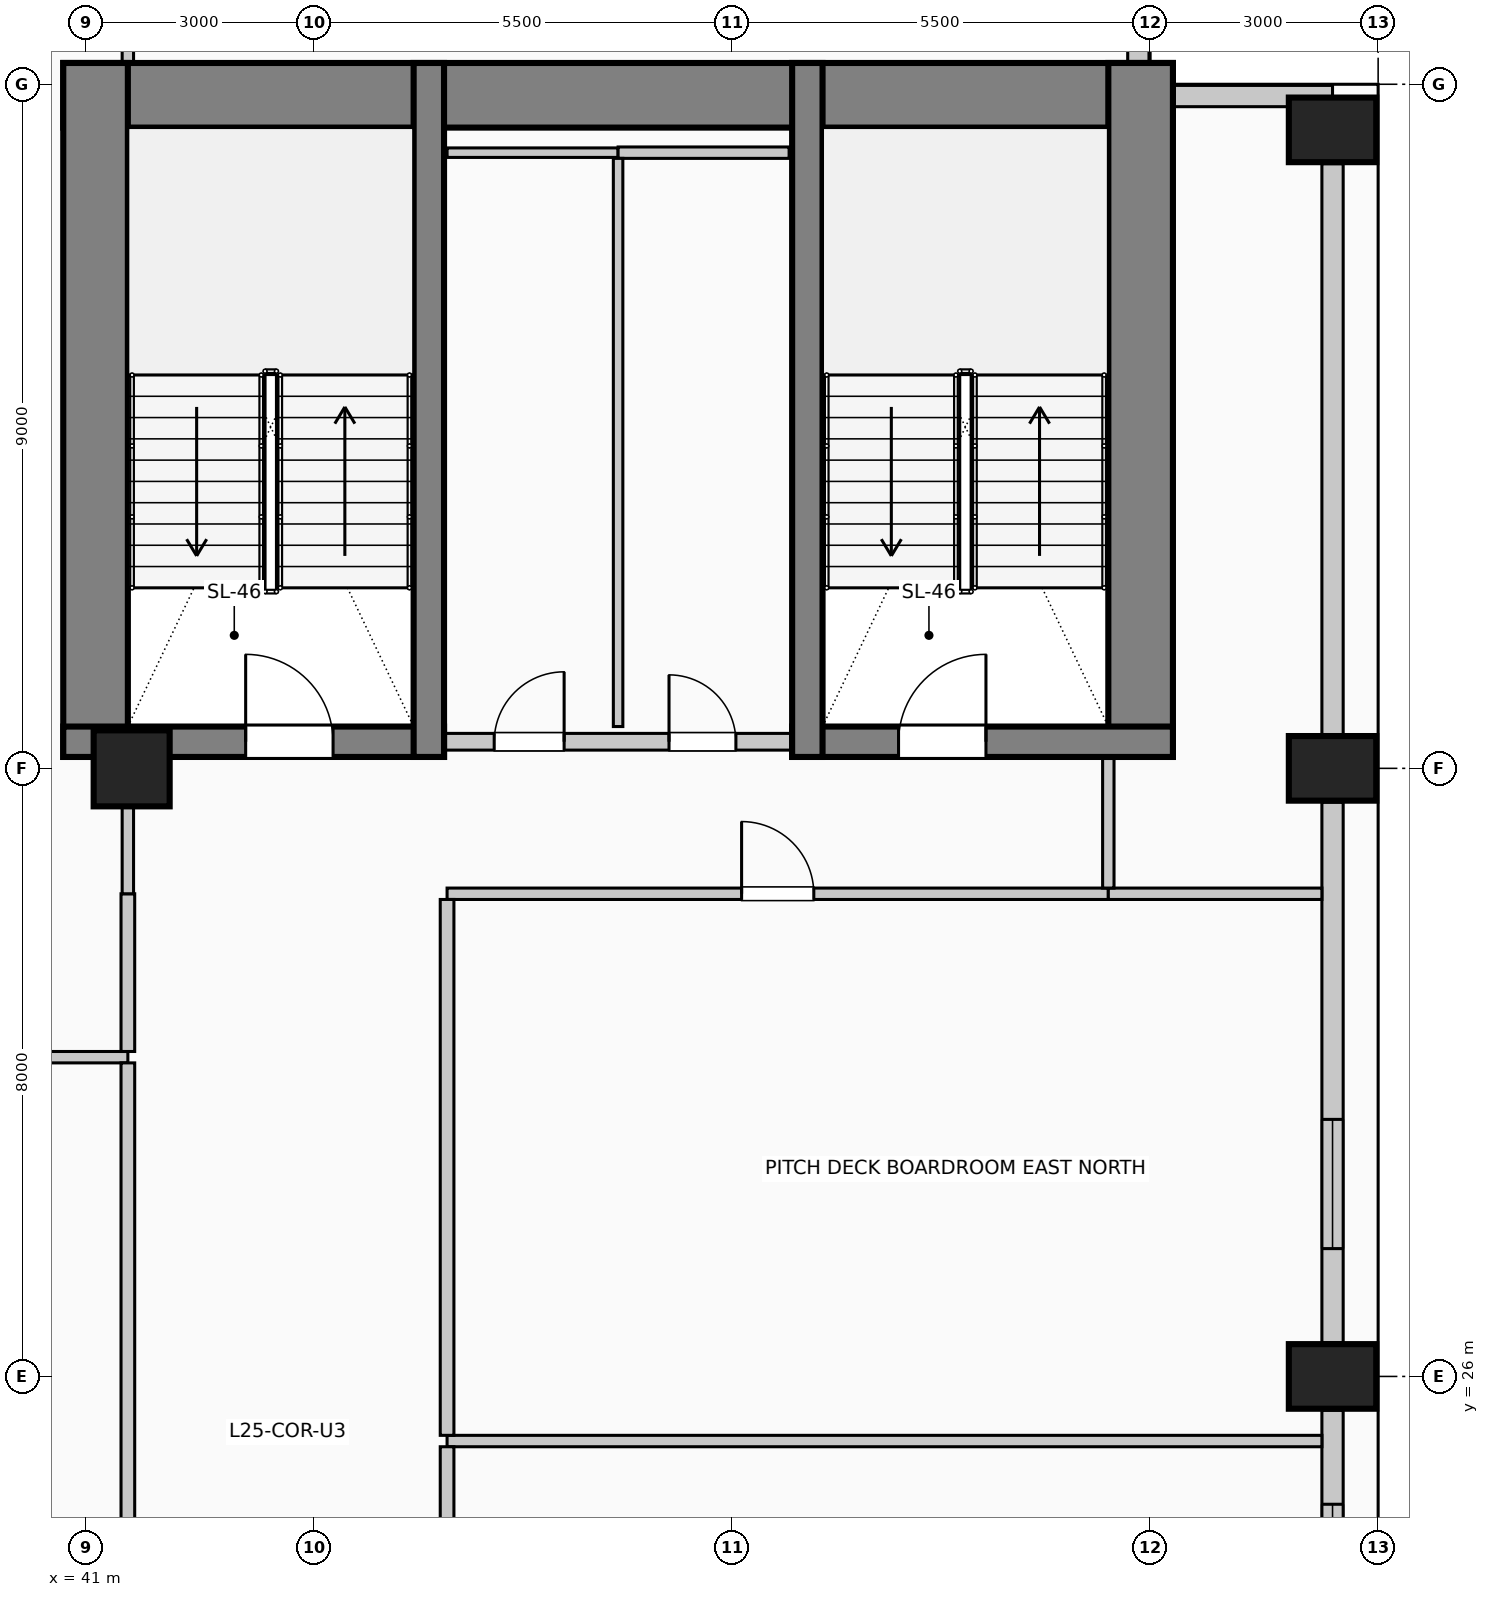
"""IFC4 building model, lengths in metres.
Left out: names, types, materials, properties, quantities, classifications, styles, units other than length and angle.
Written with IfcOpenShell. Run it as: python <this file> out.ifc"""

import sys

from ifc_helpers import new_model, si_unit, direction, frame, frame_2d, origin, origin_2d, place, context, subcontext, project, spatial, rectangle, circle, extrude, element, fill, save


model = new_model("IFC4")
c1 = context("Model", 3, precision=1e-05, world=origin(), true_north=direction((0.0, 1.0)))
c2 = subcontext(c1, "Body", "Model", "MODEL_VIEW")
j1 = project(units=[si_unit("LENGTHUNIT", "METRE"), si_unit("PLANEANGLEUNIT", "RADIAN")], contexts=[c1])
p1 = place(None, origin())
s1 = spatial("IfcSite", under=j1, at=p1, CompositionType="ELEMENT")
p2 = place(p1, origin())
s2 = spatial("IfcBuilding", under=s1, at=p2, CompositionType="ELEMENT")
p3 = place(p2, frame((0.0, 0.0, 104.6)))
s3 = spatial("IfcBuildingStorey", under=s2, at=p3, CompositionType="ELEMENT", Elevation=104.6)
p4 = place(p3, frame((40.7, 42.855, 0.0), z_axis=(0.0, 0.0, 1.0), x_axis=(1.0, 0.0, 0.0)))
e1 = element("IfcWall", 1, at=p4, inside=s3, PredefinedType="SHEAR", context=c2, shape_type="SweptSolid", body=[
    extrude(rectangle(XDim=14.6, YDim=0.85, at=frame_2d((7.3, 0.0))), origin(), (0.0, 0.0, 1.0), 4.0),
])
for number, where, z_axis, x_axis in (
    (2, (41.125, 34.15, 0.0), (0.0, 0.0, 1.0), (0.0, 1.0, 0.0)),
    (3, (54.875, 34.15, 0.0), (0.0, 0.0, 1.0), (0.0, 1.0, 0.0)),
):
    element("IfcWall", number, at=place(p3, frame(where, z_axis=z_axis, x_axis=x_axis)), inside=s3, PredefinedType="SHEAR", context=c2, shape_type="SweptSolid", body=[
        extrude(rectangle(XDim=9.13, YDim=0.85, at=frame_2d((4.565, 0.0))), origin(), (0.0, 0.0, 1.0), 4.0),
    ])
p5 = place(p3, frame((40.7, 34.35, 0.0), z_axis=(0.0, 0.0, 1.0), x_axis=(1.0, 0.0, 0.0)))
e4 = element("IfcWall", 4, at=p5, inside=s3, PredefinedType="SHEAR", context=c2, shape_type="SweptSolid", body=[
    extrude(rectangle(XDim=5.01, YDim=0.4, at=frame_2d((2.505, 0.0))), origin(), (0.0, 0.0, 1.0), 4.0),
])
p6 = place(p5, frame((2.4, 0.0, 0.0)))
e5 = element("IfcOpeningElement", 5, at=p6, cuts=e4, PredefinedType="OPENING", context=c2, shape_type="SweptSolid", body=[
    extrude(rectangle(XDim=1.15, YDim=2.2, at=frame_2d((0.575, 1.1))), frame((0.0, 0.21, 0.0), z_axis=(0.0, -1.0, 0.0), x_axis=(1.0, 0.0, 0.0)), (0.0, 0.0, 1.0), 0.42),
])
p7 = place(p3, frame((45.51, 34.15, 0.0), z_axis=(0.0, 0.0, 1.0), x_axis=(0.0, 1.0, 0.0)))
e6 = element("IfcWall", 6, at=p7, inside=s3, PredefinedType="SHEAR", context=c2, shape_type="SweptSolid", body=[
    extrude(rectangle(XDim=9.13, YDim=0.4, at=frame_2d((4.565, 0.0))), origin(), (0.0, 0.0, 1.0), 4.0),
])
p8 = place(p3, frame((50.29, 34.35, 0.0), z_axis=(0.0, 0.0, 1.0), x_axis=(1.0, 0.0, 0.0)))
e7 = element("IfcWall", 7, at=p8, inside=s3, PredefinedType="SHEAR", context=c2, shape_type="SweptSolid", body=[
    extrude(rectangle(XDim=5.01, YDim=0.4, at=frame_2d((2.505, 0.0))), origin(), (0.0, 0.0, 1.0), 4.0),
])
p9 = place(p8, frame((1.4, 0.0, 0.0)))
e8 = element("IfcOpeningElement", 8, at=p9, cuts=e7, PredefinedType="OPENING", context=c2, shape_type="SweptSolid", body=[
    extrude(rectangle(XDim=1.15, YDim=2.2, at=frame_2d((0.575, 1.1))), frame((0.0, 0.21, 0.0), z_axis=(0.0, -1.0, 0.0), x_axis=(1.0, 0.0, 0.0)), (0.0, 0.0, 1.0), 0.42),
])
p10 = place(p3, frame((50.49, 34.15, 0.0), z_axis=(0.0, 0.0, 1.0), x_axis=(0.0, 1.0, 0.0)))
e9 = element("IfcWall", 9, at=p10, inside=s3, PredefinedType="SHEAR", context=c2, shape_type="SweptSolid", body=[
    extrude(rectangle(XDim=9.13, YDim=0.4, at=frame_2d((4.565, 0.0))), origin(), (0.0, 0.0, 1.0), 4.0),
])
for number, where, z_axis, x_axis in (
    (10, (57.4, 26.0, 0.0), (0.0, 0.0, 1.0), (0.0, 1.0, 0.0)),
    (11, (57.4, 34.0, 0.0), (0.0, 0.0, 1.0), (0.0, 1.0, 0.0)),
    (12, (57.4, 42.4, 0.0), (0.0, 0.0, 1.0), (0.0, 1.0, 0.0)),
):
    element("IfcColumn", number, at=place(p3, frame(where, z_axis=z_axis, x_axis=x_axis)), inside=s3, PredefinedType="COLUMN", context=c2, shape_type="SweptSolid", body=[
        extrude(rectangle(XDim=0.85, YDim=1.15, at=origin_2d()), origin(), (0.0, 0.0, 1.0), 4.0),
    ])
p11 = place(p3, frame((41.6, 34.0, 0.0), z_axis=(0.0, 0.0, 1.0), x_axis=(1.0, 0.0, 0.0)))
e13 = element("IfcColumn", 13, at=p11, inside=s3, PredefinedType="COLUMN", context=c2, shape_type="SweptSolid", body=[
    extrude(circle(Radius=0.5, at=origin_2d()), origin(), (0.0, 0.0, 1.0), 4.0),
])
p12 = place(p3, frame((57.4, 25.555, 0.0), z_axis=(0.0, 0.0, 1.0), x_axis=(0.0, -1.0, 0.0)))
e14 = element("IfcWall", 14, at=p12, inside=s3, PredefinedType="SOLIDWALL", context=c2, shape_type="SweptSolid", body=[
    extrude(rectangle(XDim=7.11, YDim=0.28, at=frame_2d((3.555, 0.0))), origin(), (0.0, 0.0, 1.0), 2.875),
])
p13 = place(p12, frame((1.237, 0.0, 0.5)))
e15 = element("IfcOpeningElement", 15, at=p13, cuts=e14, PredefinedType="OPENING", context=c2, shape_type="SweptSolid", body=[
    extrude(rectangle(XDim=1.7, YDim=1.95, at=frame_2d((0.85, 0.975))), frame((0.0, 0.15, 0.0), z_axis=(0.0, -1.0, 0.0), x_axis=(1.0, 0.0, 0.0)), (0.0, 0.0, 1.0), 0.3),
])
p14 = place(p12, frame((4.173, 0.0, 0.5)))
e16 = element("IfcOpeningElement", 16, at=p14, cuts=e14, PredefinedType="OPENING", context=c2, shape_type="SweptSolid", body=[
    extrude(rectangle(XDim=1.7, YDim=1.95, at=frame_2d((0.85, 0.975))), frame((0.0, 0.15, 0.0), z_axis=(0.0, -1.0, 0.0), x_axis=(1.0, 0.0, 0.0)), (0.0, 0.0, 1.0), 0.3),
])
p15 = place(p3, frame((57.4, 33.555, 0.0), z_axis=(0.0, 0.0, 1.0), x_axis=(0.0, -1.0, 0.0)))
e17 = element("IfcWall", 17, at=p15, inside=s3, PredefinedType="SOLIDWALL", context=c2, shape_type="SweptSolid", body=[
    extrude(rectangle(XDim=7.11, YDim=0.28, at=frame_2d((3.555, 0.0))), origin(), (0.0, 0.0, 1.0), 2.875),
])
p16 = place(p15, frame((4.173, 0.0, 0.5)))
e18 = element("IfcOpeningElement", 18, at=p16, cuts=e17, PredefinedType="OPENING", context=c2, shape_type="SweptSolid", body=[
    extrude(rectangle(XDim=1.7, YDim=1.95, at=frame_2d((0.85, 0.975))), frame((0.0, 0.15, 0.0), z_axis=(0.0, -1.0, 0.0), x_axis=(1.0, 0.0, 0.0)), (0.0, 0.0, 1.0), 0.3),
])
p17 = place(p3, frame((57.4, 41.955, 0.0), z_axis=(0.0, 0.0, 1.0), x_axis=(0.0, -1.0, 0.0)))
e19 = element("IfcWall", 19, at=p17, inside=s3, PredefinedType="SOLIDWALL", context=c2, shape_type="SweptSolid", body=[
    extrude(rectangle(XDim=7.51, YDim=0.28, at=frame_2d((3.755, 0.0))), origin(), (0.0, 0.0, 1.0), 2.875),
])
p18 = place(p3, frame((54.845, 45.4, 0.0), z_axis=(0.0, 0.0, 1.0), x_axis=(0.0, -1.0, 0.0)))
e20 = element("IfcWall", 20, at=p18, inside=s3, PredefinedType="SOLIDWALL", context=c2, shape_type="SweptSolid", body=[
    extrude(rectangle(XDim=2.115, YDim=0.28, at=frame_2d((1.058, 0.0))), origin(), (0.0, 0.0, 1.0), 3.725),
])
p19 = place(p3, frame((55.305, 42.845, 0.0), z_axis=(0.0, 0.0, 1.0), x_axis=(1.0, 0.0, 0.0)))
e21 = element("IfcWall", 21, at=p19, inside=s3, PredefinedType="SOLIDWALL", context=c2, shape_type="SweptSolid", body=[
    extrude(rectangle(XDim=2.095, YDim=0.28, at=frame_2d((1.047, 0.0))), origin(), (0.0, 0.0, 1.0), 3.725),
])
p20 = place(p3, frame((45.72, 34.35, 0.0), z_axis=(0.0, 0.0, 1.0), x_axis=(1.0, 0.0, 0.0)))
e22 = element("IfcWall", 22, at=p20, inside=s3, PredefinedType="PARTITIONING", context=c2, shape_type="SweptSolid", body=[
    extrude(rectangle(XDim=4.56, YDim=0.22, at=frame_2d((2.28, 0.0))), origin(), (0.0, 0.0, 1.0), 3.725),
])
p21 = place(p20, frame((0.65, 0.0, 0.0)))
e23 = element("IfcOpeningElement", 23, at=p21, cuts=e22, PredefinedType="OPENING", context=c2, shape_type="SweptSolid", body=[
    extrude(rectangle(XDim=0.92, YDim=2.1, at=frame_2d((0.46, 1.05))), frame((0.0, 0.12, 0.0), z_axis=(0.0, -1.0, 0.0), x_axis=(1.0, 0.0, 0.0)), (0.0, 0.0, 1.0), 0.24),
])
p22 = place(p20, frame((2.95, 0.0, 0.0)))
e24 = element("IfcOpeningElement", 24, at=p22, cuts=e22, PredefinedType="OPENING", context=c2, shape_type="SweptSolid", body=[
    extrude(rectangle(XDim=0.88, YDim=2.1, at=frame_2d((0.44, 1.05))), frame((0.0, 0.12, 0.0), z_axis=(0.0, -1.0, 0.0), x_axis=(1.0, 0.0, 0.0)), (0.0, 0.0, 1.0), 0.24),
])
p23 = place(p3, frame((45.75, 25.15, 0.0), z_axis=(0.0, 0.0, 1.0), x_axis=(1.0, 0.0, 0.0)))
e25 = element("IfcWall", 25, at=p23, inside=s3, PredefinedType="PARTITIONING", context=c2, shape_type="SweptSolid", body=[
    extrude(rectangle(XDim=11.51, YDim=0.15, at=frame_2d((5.755, 0.0))), origin(), (0.0, 0.0, 1.0), 3.17),
])
p24 = place(p3, frame((20.3, 30.2, 0.0), z_axis=(0.0, 0.0, 1.0), x_axis=(1.0, 0.0, 0.0)))
e26 = element("IfcWall", 26, at=p24, inside=s3, PredefinedType="PARTITIONING", context=c2, shape_type="SweptSolid", body=[
    extrude(rectangle(XDim=21.25, YDim=0.15, at=frame_2d((10.625, 0.0))), origin(), (0.0, 0.0, 1.0), 3.725),
])
p25 = place(p3, frame((45.75, 32.35, 0.0), z_axis=(0.0, 0.0, 1.0), x_axis=(1.0, 0.0, 0.0)))
e27 = element("IfcWall", 27, at=p25, inside=s3, PredefinedType="PARTITIONING", context=c2, shape_type="SweptSolid", body=[
    extrude(rectangle(XDim=8.7, YDim=0.15, at=frame_2d((4.35, 0.0))), origin(), (0.0, 0.0, 1.0), 3.725),
])
p26 = place(p25, frame((3.875, 0.0, 0.0)))
e28 = element("IfcOpeningElement", 28, at=p26, cuts=e27, PredefinedType="OPENING", context=c2, shape_type="SweptSolid", body=[
    extrude(rectangle(XDim=0.95, YDim=2.15, at=frame_2d((0.475, 1.075))), frame((0.0, 0.085, 0.0), z_axis=(0.0, -1.0, 0.0), x_axis=(1.0, 0.0, 0.0)), (0.0, 0.0, 1.0), 0.17),
])
p27 = place(p3, frame((54.45, 32.35, 0.0), z_axis=(0.0, 0.0, 1.0), x_axis=(1.0, 0.0, 0.0)))
e29 = element("IfcWall", 29, at=p27, inside=s3, PredefinedType="PARTITIONING", context=c2, shape_type="SweptSolid", body=[
    extrude(rectangle(XDim=2.81, YDim=0.15, at=frame_2d((1.405, 0.0))), origin(), (0.0, 0.0, 1.0), 3.725),
])
p28 = place(p3, frame((45.75, 42.1, 0.0), z_axis=(0.0, 0.0, 1.0), x_axis=(1.0, 0.0, 0.0)))
e30 = element("IfcWall", 30, at=p28, inside=s3, PredefinedType="PARTITIONING", context=c2, shape_type="SweptSolid", body=[
    extrude(rectangle(XDim=2.25, YDim=0.125, at=frame_2d((1.125, 0.0))), origin(), (0.0, 0.0, 1.0), 3.725),
])
p29 = place(p3, frame((48.0, 42.1, 0.0), z_axis=(0.0, 0.0, 1.0), x_axis=(1.0, 0.0, 0.0)))
e31 = element("IfcWall", 31, at=p29, inside=s3, PredefinedType="PARTITIONING", context=c2, shape_type="SweptSolid", body=[
    extrude(rectangle(XDim=2.25, YDim=0.15, at=frame_2d((1.125, 0.0))), origin(), (0.0, 0.0, 1.0), 3.725),
])
p30 = place(p3, frame((41.55, 18.5, 0.0), z_axis=(0.0, 0.0, 1.0), x_axis=(0.0, 1.0, 0.0)))
e32 = element("IfcWall", 32, at=p30, inside=s3, PredefinedType="PARTITIONING", context=c2, shape_type="SweptSolid", body=[
    extrude(rectangle(XDim=11.625, YDim=0.18, at=frame_2d((5.812, 0.0))), origin(), (0.0, 0.0, 1.0), 3.07),
])
p31 = place(p3, frame((41.55, 30.275, 0.0), z_axis=(0.0, 0.0, 1.0), x_axis=(0.0, 1.0, 0.0)))
e33 = element("IfcWall", 33, at=p31, inside=s3, PredefinedType="PARTITIONING", context=c2, shape_type="SweptSolid", body=[
    extrude(rectangle(XDim=2.075, YDim=0.18, at=frame_2d((1.038, 0.0))), origin(), (0.0, 0.0, 1.0), 3.07),
])
p32 = place(p3, frame((41.55, 32.35, 0.0), z_axis=(0.0, 0.0, 1.0), x_axis=(0.0, 1.0, 0.0)))
e34 = element("IfcWall", 34, at=p32, inside=s3, PredefinedType="PARTITIONING", context=c2, shape_type="SweptSolid", body=[
    extrude(rectangle(XDim=1.15, YDim=0.15, at=frame_2d((0.575, 0.0))), origin(), (0.0, 0.0, 1.0), 3.07),
])
p33 = place(p3, frame((41.55, 43.28, 0.0), z_axis=(0.0, 0.0, 1.0), x_axis=(0.0, 1.0, 0.0)))
e35 = element("IfcWall", 35, at=p33, inside=s3, PredefinedType="PARTITIONING", context=c2, shape_type="SweptSolid", body=[
    extrude(rectangle(XDim=1.42, YDim=0.15, at=frame_2d((0.71, 0.0))), origin(), (0.0, 0.0, 1.0), 3.725),
])
p34 = place(p3, frame((45.75, 15.74, 0.0), z_axis=(0.0, 0.0, 1.0), x_axis=(0.0, 1.0, 0.0)))
e36 = element("IfcWall", 36, at=p34, inside=s3, PredefinedType="PARTITIONING", context=c2, shape_type="SweptSolid", body=[
    extrude(rectangle(XDim=9.335, YDim=0.18, at=frame_2d((4.667, 0.0))), origin(), (0.0, 0.0, 1.0), 3.725),
])
p35 = place(p3, frame((45.75, 25.225, 0.0), z_axis=(0.0, 0.0, 1.0), x_axis=(0.0, 1.0, 0.0)))
e37 = element("IfcWall", 37, at=p35, inside=s3, PredefinedType="PARTITIONING", context=c2, shape_type="SweptSolid", body=[
    extrude(rectangle(XDim=7.05, YDim=0.18, at=frame_2d((3.525, 0.0))), origin(), (0.0, 0.0, 1.0), 3.725),
])
p36 = place(p3, frame((48.0, 34.55, 0.0), z_axis=(0.0, 0.0, 1.0), x_axis=(0.0, 1.0, 0.0)))
e38 = element("IfcWall", 38, at=p36, inside=s3, PredefinedType="PARTITIONING", context=c2, shape_type="SweptSolid", body=[
    extrude(rectangle(XDim=7.475, YDim=0.125, at=frame_2d((3.737, 0.0))), origin(), (0.0, 0.0, 1.0), 3.725),
])
p37 = place(p3, frame((54.45, 32.425, 0.0), z_axis=(0.0, 0.0, 1.0), x_axis=(0.0, 1.0, 0.0)))
e39 = element("IfcWall", 39, at=p37, inside=s3, PredefinedType="PARTITIONING", context=c2, shape_type="SweptSolid", body=[
    extrude(rectangle(XDim=1.725, YDim=0.15, at=frame_2d((0.862, 0.0))), origin(), (0.0, 0.0, 1.0), 3.725),
])
p38 = place(p13, origin())
e40 = element("IfcWindow", 40, at=p38, inside=s3, PartitioningType="SINGLE_PANEL", PredefinedType="WINDOW", context=c2, shape_type="SweptSolid", body=[
    extrude(rectangle(XDim=1.7, YDim=1.95, at=frame_2d((0.85, 0.975))), frame((0.0, 0.03, 0.0), z_axis=(0.0, -1.0, 0.0), x_axis=(1.0, 0.0, 0.0)), (0.0, 0.0, 1.0), 0.06),
])
fill(e15, e40)
p39 = place(p16, origin())
e41 = element("IfcWindow", 41, at=p39, inside=s3, PartitioningType="SINGLE_PANEL", PredefinedType="WINDOW", context=c2, shape_type="SweptSolid", body=[
    extrude(rectangle(XDim=1.7, YDim=1.95, at=frame_2d((0.85, 0.975))), frame((0.0, 0.03, 0.0), z_axis=(0.0, -1.0, 0.0), x_axis=(1.0, 0.0, 0.0)), (0.0, 0.0, 1.0), 0.06),
])
fill(e18, e41)
p40 = place(p6, origin())
e42 = element("IfcDoor", 42, at=p40, inside=s3, OperationType="SINGLE_SWING_LEFT", PredefinedType="DOOR", context=c2, shape_type="SweptSolid", body=[
    extrude(rectangle(XDim=1.15, YDim=2.2, at=frame_2d((0.575, 1.1))), frame((0.0, 0.025, 0.0), z_axis=(0.0, -1.0, 0.0), x_axis=(1.0, 0.0, 0.0)), (0.0, 0.0, 1.0), 0.05),
])
fill(e5, e42)
p41 = place(p21, origin())
e43 = element("IfcDoor", 43, at=p41, inside=s3, OperationType="SINGLE_SWING_RIGHT", PredefinedType="DOOR", context=c2, shape_type="SweptSolid", body=[
    extrude(rectangle(XDim=0.92, YDim=2.1, at=frame_2d((0.46, 1.05))), frame((0.0, 0.025, 0.0), z_axis=(0.0, -1.0, 0.0), x_axis=(1.0, 0.0, 0.0)), (0.0, 0.0, 1.0), 0.05),
])
fill(e23, e43)
p42 = place(p22, origin())
e44 = element("IfcDoor", 44, at=p42, inside=s3, OperationType="SINGLE_SWING_LEFT", PredefinedType="DOOR", context=c2, shape_type="SweptSolid", body=[
    extrude(rectangle(XDim=0.88, YDim=2.1, at=frame_2d((0.44, 1.05))), frame((0.0, 0.025, 0.0), z_axis=(0.0, -1.0, 0.0), x_axis=(1.0, 0.0, 0.0)), (0.0, 0.0, 1.0), 0.05),
])
fill(e24, e44)
p43 = place(p9, origin())
e45 = element("IfcDoor", 45, at=p43, inside=s3, OperationType="SINGLE_SWING_RIGHT", PredefinedType="DOOR", context=c2, shape_type="SweptSolid", body=[
    extrude(rectangle(XDim=1.15, YDim=2.2, at=frame_2d((0.575, 1.1))), frame((0.0, 0.025, 0.0), z_axis=(0.0, -1.0, 0.0), x_axis=(1.0, 0.0, 0.0)), (0.0, 0.0, 1.0), 0.05),
])
fill(e8, e45)
p44 = place(p26, origin())
e46 = element("IfcDoor", 46, at=p44, inside=s3, OperationType="SINGLE_SWING_LEFT", PredefinedType="DOOR", context=c2, shape_type="SweptSolid", body=[
    extrude(rectangle(XDim=0.95, YDim=2.15, at=frame_2d((0.475, 1.075))), frame((0.0, 0.025, 0.0), z_axis=(0.0, -1.0, 0.0), x_axis=(1.0, 0.0, 0.0)), (0.0, 0.0, 1.0), 0.05),
])
fill(e28, e46)
save(model, sys.argv[1])
